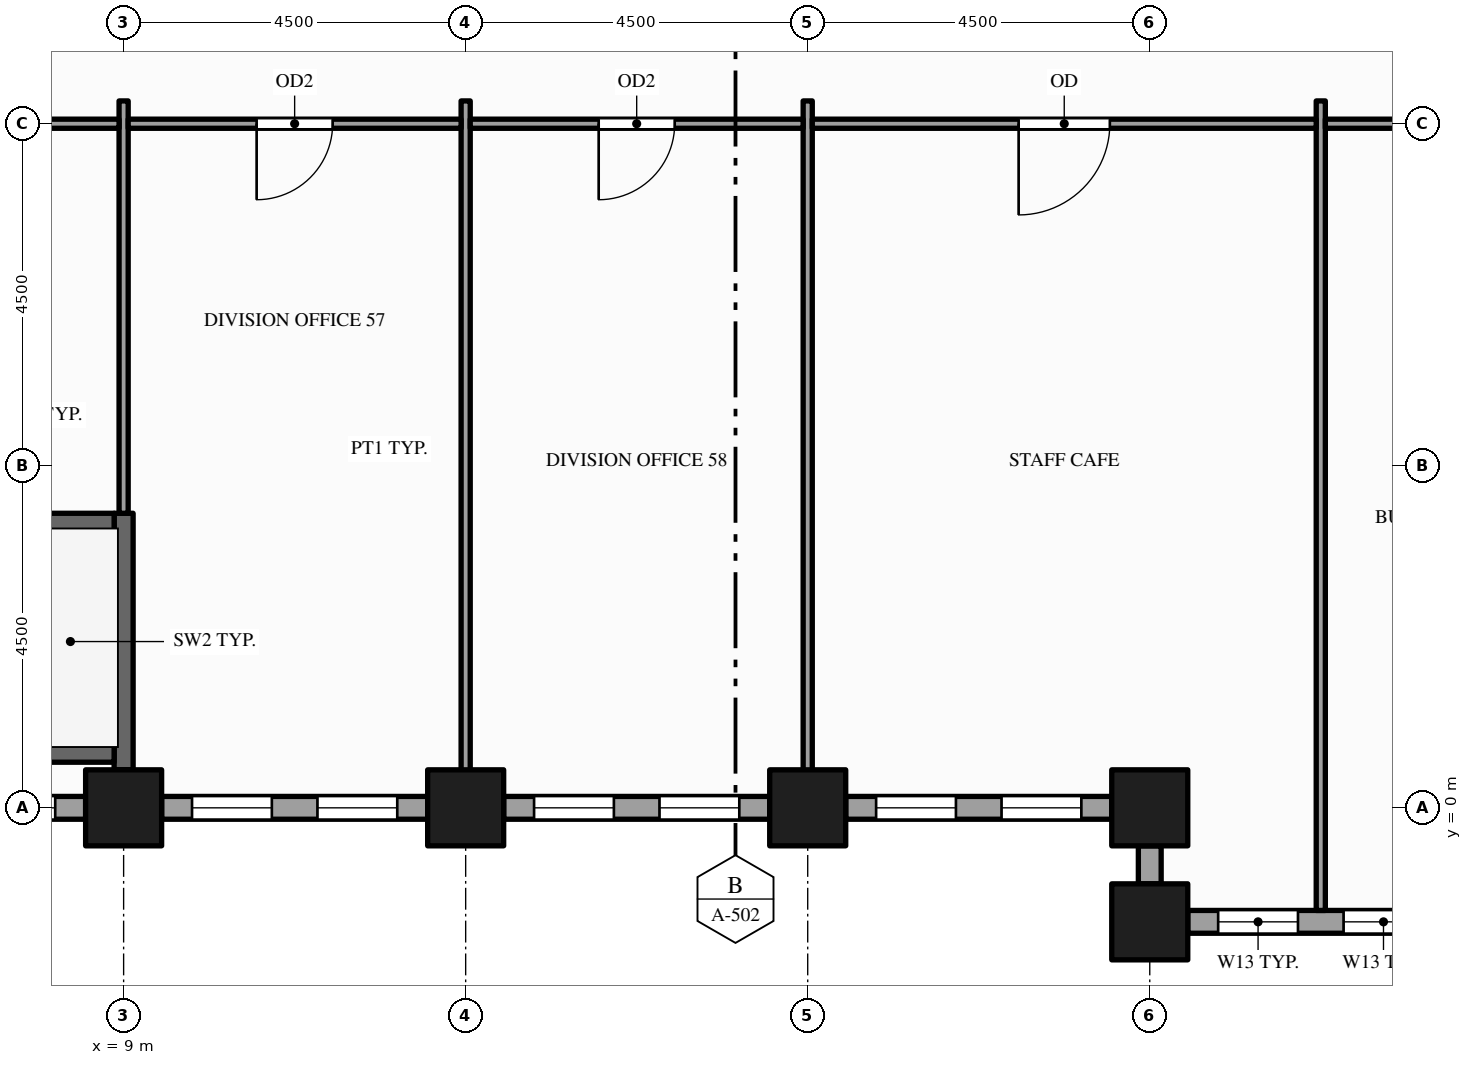
"""IFC4 building model, lengths in metres.
Left out: names, types, materials, properties, quantities, classifications, styles, units other than length and angle.
Written with IfcOpenShell. Run it as: python <this file> out.ifc"""

import sys

from ifc_helpers import new_model, si_unit, direction, frame, frame_2d, origin, origin_2d, place, context, subcontext, project, spatial, rectangle, hollow_rectangle, extrude, element, fill, save


model = new_model("IFC4")
c1 = context("Model", 3, precision=1e-05, world=origin(), true_north=direction((0.0, 1.0)))
c2 = subcontext(c1, "Body", "Model", "MODEL_VIEW")
j1 = project(units=[si_unit("LENGTHUNIT", "METRE"), si_unit("PLANEANGLEUNIT", "RADIAN")], contexts=[c1])
p1 = place(None, origin())
s1 = spatial("IfcSite", under=j1, at=p1, CompositionType="ELEMENT")
p2 = place(p1, origin())
s2 = spatial("IfcBuilding", under=s1, at=p2, CompositionType="ELEMENT")
p3 = place(p2, frame((0.0, 0.0, 119.0)))
s3 = spatial("IfcBuildingStorey", under=s2, at=p3, CompositionType="ELEMENT", Elevation=119.0)
for number, where, z_axis, x_axis in (
    (1, (9.0, 0.0, -0.15), (0.0, 0.0, 1.0), (1.0, 0.0, 0.0)),
    (2, (13.5, 0.0, -0.15), (0.0, 0.0, 1.0), (1.0, 0.0, 0.0)),
    (3, (18.0, 0.0, -0.15), (0.0, 0.0, 1.0), (1.0, 0.0, 0.0)),
    (4, (22.5, -1.5, -0.15), (0.0, 0.0, 1.0), (1.0, 0.0, 0.0)),
    (5, (22.5, 0.0, -0.15), (0.0, 0.0, 1.0), (1.0, 0.0, 0.0)),
):
    element("IfcColumn", number, at=place(p3, frame(where, z_axis=z_axis, x_axis=x_axis)), inside=s3, PredefinedType="COLUMN", context=c2, shape_type="SweptSolid", body=[
        extrude(hollow_rectangle(XDim=1.0, YDim=1.0, WallThickness=0.05, at=origin_2d()), origin(), (0.0, 0.0, 1.0), 4.0),
    ])
p4 = place(p3, frame((23.0, -1.5, 0.0), z_axis=(0.0, 0.0, 1.0), x_axis=(1.0, 0.0, 0.0)))
e6 = element("IfcWall", 6, at=p4, inside=s3, PredefinedType="STANDARD", context=c2, shape_type="SweptSolid", body=[
    extrude(rectangle(XDim=3.5, YDim=0.3, at=frame_2d((1.75, 0.0))), origin(), (0.0, 0.0, 1.0), 3.154),
])
p5 = place(p4, frame((0.4, 0.0, 0.9)))
e7 = element("IfcOpeningElement", 7, at=p5, cuts=e6, PredefinedType="OPENING", context=c2, shape_type="SweptSolid", body=[
    extrude(rectangle(XDim=1.05, YDim=2.0, at=frame_2d((0.525, 1.0))), frame((0.0, 0.16, 0.0), z_axis=(0.0, -1.0, 0.0), x_axis=(1.0, 0.0, 0.0)), (0.0, 0.0, 1.0), 0.32),
])
p6 = place(p4, frame((2.05, 0.0, 0.9)))
e8 = element("IfcOpeningElement", 8, at=p6, cuts=e6, PredefinedType="OPENING", context=c2, shape_type="SweptSolid", body=[
    extrude(rectangle(XDim=1.05, YDim=2.0, at=frame_2d((0.525, 1.0))), frame((0.0, 0.16, 0.0), z_axis=(0.0, -1.0, 0.0), x_axis=(1.0, 0.0, 0.0)), (0.0, 0.0, 1.0), 0.32),
])
p7 = place(p3, frame((5.0, 0.0, 0.0), z_axis=(0.0, 0.0, 1.0), x_axis=(1.0, 0.0, 0.0)))
e9 = element("IfcWall", 9, at=p7, inside=s3, PredefinedType="STANDARD", context=c2, shape_type="SweptSolid", body=[
    extrude(rectangle(XDim=3.5, YDim=0.3, at=frame_2d((1.75, 0.0))), origin(), (0.0, 0.0, 1.0), 3.154),
])
p8 = place(p7, frame((0.4, 0.0, 0.9)))
e10 = element("IfcOpeningElement", 10, at=p8, cuts=e9, PredefinedType="OPENING", context=c2, shape_type="SweptSolid", body=[
    extrude(rectangle(XDim=1.05, YDim=2.0, at=frame_2d((0.525, 1.0))), frame((0.0, 0.16, 0.0), z_axis=(0.0, -1.0, 0.0), x_axis=(1.0, 0.0, 0.0)), (0.0, 0.0, 1.0), 0.32),
])
p9 = place(p7, frame((2.05, 0.0, 0.9)))
e11 = element("IfcOpeningElement", 11, at=p9, cuts=e9, PredefinedType="OPENING", context=c2, shape_type="SweptSolid", body=[
    extrude(rectangle(XDim=1.05, YDim=2.0, at=frame_2d((0.525, 1.0))), frame((0.0, 0.16, 0.0), z_axis=(0.0, -1.0, 0.0), x_axis=(1.0, 0.0, 0.0)), (0.0, 0.0, 1.0), 0.32),
])
p10 = place(p3, frame((9.5, 0.0, 0.0), z_axis=(0.0, 0.0, 1.0), x_axis=(1.0, 0.0, 0.0)))
e12 = element("IfcWall", 12, at=p10, inside=s3, PredefinedType="STANDARD", context=c2, shape_type="SweptSolid", body=[
    extrude(rectangle(XDim=3.5, YDim=0.3, at=frame_2d((1.75, 0.0))), origin(), (0.0, 0.0, 1.0), 3.154),
])
p11 = place(p10, frame((0.4, 0.0, 0.9)))
e13 = element("IfcOpeningElement", 13, at=p11, cuts=e12, PredefinedType="OPENING", context=c2, shape_type="SweptSolid", body=[
    extrude(rectangle(XDim=1.05, YDim=2.0, at=frame_2d((0.525, 1.0))), frame((0.0, 0.16, 0.0), z_axis=(0.0, -1.0, 0.0), x_axis=(1.0, 0.0, 0.0)), (0.0, 0.0, 1.0), 0.32),
])
p12 = place(p10, frame((2.05, 0.0, 0.9)))
e14 = element("IfcOpeningElement", 14, at=p12, cuts=e12, PredefinedType="OPENING", context=c2, shape_type="SweptSolid", body=[
    extrude(rectangle(XDim=1.05, YDim=2.0, at=frame_2d((0.525, 1.0))), frame((0.0, 0.16, 0.0), z_axis=(0.0, -1.0, 0.0), x_axis=(1.0, 0.0, 0.0)), (0.0, 0.0, 1.0), 0.32),
])
p13 = place(p3, frame((14.0, 0.0, 0.0), z_axis=(0.0, 0.0, 1.0), x_axis=(1.0, 0.0, 0.0)))
e15 = element("IfcWall", 15, at=p13, inside=s3, PredefinedType="STANDARD", context=c2, shape_type="SweptSolid", body=[
    extrude(rectangle(XDim=3.5, YDim=0.3, at=frame_2d((1.75, 0.0))), origin(), (0.0, 0.0, 1.0), 3.154),
])
p14 = place(p13, frame((0.4, 0.0, 0.9)))
e16 = element("IfcOpeningElement", 16, at=p14, cuts=e15, PredefinedType="OPENING", context=c2, shape_type="SweptSolid", body=[
    extrude(rectangle(XDim=1.05, YDim=2.0, at=frame_2d((0.525, 1.0))), frame((0.0, 0.16, 0.0), z_axis=(0.0, -1.0, 0.0), x_axis=(1.0, 0.0, 0.0)), (0.0, 0.0, 1.0), 0.32),
])
p15 = place(p13, frame((2.05, 0.0, 0.9)))
e17 = element("IfcOpeningElement", 17, at=p15, cuts=e15, PredefinedType="OPENING", context=c2, shape_type="SweptSolid", body=[
    extrude(rectangle(XDim=1.05, YDim=2.0, at=frame_2d((0.525, 1.0))), frame((0.0, 0.16, 0.0), z_axis=(0.0, -1.0, 0.0), x_axis=(1.0, 0.0, 0.0)), (0.0, 0.0, 1.0), 0.32),
])
p16 = place(p3, frame((18.5, 0.0, 0.0), z_axis=(0.0, 0.0, 1.0), x_axis=(1.0, 0.0, 0.0)))
e18 = element("IfcWall", 18, at=p16, inside=s3, PredefinedType="STANDARD", context=c2, shape_type="SweptSolid", body=[
    extrude(rectangle(XDim=3.5, YDim=0.3, at=frame_2d((1.75, 0.0))), origin(), (0.0, 0.0, 1.0), 3.154),
])
p17 = place(p16, frame((0.4, 0.0, 0.9)))
e19 = element("IfcOpeningElement", 19, at=p17, cuts=e18, PredefinedType="OPENING", context=c2, shape_type="SweptSolid", body=[
    extrude(rectangle(XDim=1.05, YDim=2.0, at=frame_2d((0.525, 1.0))), frame((0.0, 0.16, 0.0), z_axis=(0.0, -1.0, 0.0), x_axis=(1.0, 0.0, 0.0)), (0.0, 0.0, 1.0), 0.32),
])
p18 = place(p16, frame((2.05, 0.0, 0.9)))
e20 = element("IfcOpeningElement", 20, at=p18, cuts=e18, PredefinedType="OPENING", context=c2, shape_type="SweptSolid", body=[
    extrude(rectangle(XDim=1.05, YDim=2.0, at=frame_2d((0.525, 1.0))), frame((0.0, 0.16, 0.0), z_axis=(0.0, -1.0, 0.0), x_axis=(1.0, 0.0, 0.0)), (0.0, 0.0, 1.0), 0.32),
])
p19 = place(p3, frame((22.5, -0.5, 0.0), z_axis=(0.0, 0.0, 1.0), x_axis=(0.0, -1.0, 0.0)))
e21 = element("IfcWall", 21, at=p19, inside=s3, PredefinedType="STANDARD", context=c2, shape_type="SweptSolid", body=[
    extrude(rectangle(XDim=0.5, YDim=0.3, at=frame_2d((0.25, 0.0))), origin(), (0.0, 0.0, 1.0), 3.154),
])
p20 = place(p3, frame((9.0, 0.15, 0.0), z_axis=(0.0, 0.0, 1.0), x_axis=(0.0, 1.0, 0.0)))
e22 = element("IfcWall", 22, at=p20, inside=s3, PredefinedType="PARTITIONING", context=c2, shape_type="SweptSolid", body=[
    extrude(rectangle(XDim=0.35, YDim=0.12, at=frame_2d((0.175, 0.0))), origin(), (0.0, 0.0, 1.0), 3.85),
])
p21 = place(p3, frame((9.0, 0.5, 0.0), z_axis=(0.0, 0.0, 1.0), x_axis=(0.0, 1.0, 0.0)))
e23 = element("IfcWall", 23, at=p21, inside=s3, PredefinedType="SHEAR", context=c2, shape_type="SweptSolid", body=[
    extrude(rectangle(XDim=3.375, YDim=0.25, at=frame_2d((1.688, 0.0))), origin(), (0.0, 0.0, 1.0), 3.85),
])
p22 = place(p3, frame((9.0, 3.875, 0.0), z_axis=(0.0, 0.0, 1.0), x_axis=(0.0, 1.0, 0.0)))
e24 = element("IfcWall", 24, at=p22, inside=s3, PredefinedType="PARTITIONING", context=c2, shape_type="SweptSolid", body=[
    extrude(rectangle(XDim=5.425, YDim=0.12, at=frame_2d((2.712, 0.0))), origin(), (0.0, 0.0, 1.0), 2.938),
])
for number, where, z_axis, x_axis in (
    (25, (13.5, 0.15, 0.0), (0.0, 0.0, 1.0), (0.0, 1.0, 0.0)),
    (26, (18.0, 0.15, 0.0), (0.0, 0.0, 1.0), (0.0, 1.0, 0.0)),
):
    element("IfcWall", number, at=place(p3, frame(where, z_axis=z_axis, x_axis=x_axis)), inside=s3, PredefinedType="PARTITIONING", context=c2, shape_type="SweptSolid", body=[
        extrude(rectangle(XDim=9.15, YDim=0.12, at=frame_2d((4.575, 0.0))), origin(), (0.0, 0.0, 1.0), 2.938),
    ])
p23 = place(p3, frame((24.75, -1.35, 0.0), z_axis=(0.0, 0.0, 1.0), x_axis=(0.0, 1.0, 0.0)))
e27 = element("IfcWall", 27, at=p23, inside=s3, PredefinedType="PARTITIONING", context=c2, shape_type="SweptSolid", body=[
    extrude(rectangle(XDim=10.65, YDim=0.12, at=frame_2d((5.325, 0.0))), origin(), (0.0, 0.0, 1.0), 2.76),
])
p24 = place(p3, frame((0.85, 0.725, 0.0), z_axis=(0.0, 0.0, 1.0), x_axis=(1.0, 0.0, 0.0)))
e28 = element("IfcWall", 28, at=p24, inside=s3, PredefinedType="SHEAR", context=c2, shape_type="SweptSolid", body=[
    extrude(rectangle(XDim=8.025, YDim=0.25, at=frame_2d((4.012, 0.0))), origin(), (0.0, 0.0, 1.0), 3.85),
])
p25 = place(p3, frame((0.85, 3.75, 0.0), z_axis=(0.0, 0.0, 1.0), x_axis=(1.0, 0.0, 0.0)))
e29 = element("IfcWall", 29, at=p25, inside=s3, PredefinedType="SHEAR", context=c2, shape_type="SweptSolid", body=[
    extrude(rectangle(XDim=8.025, YDim=0.25, at=frame_2d((4.012, 0.0))), origin(), (0.0, 0.0, 1.0), 3.85),
])
p26 = place(p25, frame((0.15, 0.0, 0.0)))
e30 = element("IfcOpeningElement", 30, at=p26, cuts=e29, PredefinedType="OPENING", context=c2, shape_type="SweptSolid", body=[
    extrude(rectangle(XDim=1.1, YDim=2.1, at=frame_2d((0.55, 1.05))), frame((0.0, 0.135, 0.0), z_axis=(0.0, -1.0, 0.0), x_axis=(1.0, 0.0, 0.0)), (0.0, 0.0, 1.0), 0.27),
])
p27 = place(p3, frame((0.15, 9.0, 0.0), z_axis=(0.0, 0.0, 1.0), x_axis=(1.0, 0.0, 0.0)))
e31 = element("IfcWall", 31, at=p27, inside=s3, PredefinedType="PARTITIONING", context=c2, shape_type="SweptSolid", body=[
    extrude(rectangle(XDim=8.79, YDim=0.12, at=frame_2d((4.395, 0.0))), origin(), (0.0, 0.0, 1.0), 2.938),
])
p28 = place(p27, frame((3.805, 0.0, 0.0)))
e32 = element("IfcOpeningElement", 32, at=p28, cuts=e31, PredefinedType="OPENING", context=c2, shape_type="SweptSolid", body=[
    extrude(rectangle(XDim=1.2, YDim=2.1, at=frame_2d((0.6, 1.05))), frame((0.0, 0.07, 0.0), z_axis=(0.0, -1.0, 0.0), x_axis=(1.0, 0.0, 0.0)), (0.0, 0.0, 1.0), 0.14),
])
p29 = place(p3, frame((9.06, 9.0, 0.0), z_axis=(0.0, 0.0, 1.0), x_axis=(1.0, 0.0, 0.0)))
e33 = element("IfcWall", 33, at=p29, inside=s3, PredefinedType="PARTITIONING", context=c2, shape_type="SweptSolid", body=[
    extrude(rectangle(XDim=4.38, YDim=0.12, at=frame_2d((2.19, 0.0))), origin(), (0.0, 0.0, 1.0), 2.938),
])
p30 = place(p29, frame((1.69, 0.0, 0.0)))
e34 = element("IfcOpeningElement", 34, at=p30, cuts=e33, PredefinedType="OPENING", context=c2, shape_type="SweptSolid", body=[
    extrude(rectangle(XDim=1.0, YDim=2.1, at=frame_2d((0.5, 1.05))), frame((0.0, 0.07, 0.0), z_axis=(0.0, -1.0, 0.0), x_axis=(1.0, 0.0, 0.0)), (0.0, 0.0, 1.0), 0.14),
])
p31 = place(p3, frame((13.56, 9.0, 0.0), z_axis=(0.0, 0.0, 1.0), x_axis=(1.0, 0.0, 0.0)))
e35 = element("IfcWall", 35, at=p31, inside=s3, PredefinedType="PARTITIONING", context=c2, shape_type="SweptSolid", body=[
    extrude(rectangle(XDim=4.38, YDim=0.12, at=frame_2d((2.19, 0.0))), origin(), (0.0, 0.0, 1.0), 2.938),
])
p32 = place(p31, frame((1.69, 0.0, 0.0)))
e36 = element("IfcOpeningElement", 36, at=p32, cuts=e35, PredefinedType="OPENING", context=c2, shape_type="SweptSolid", body=[
    extrude(rectangle(XDim=1.0, YDim=2.1, at=frame_2d((0.5, 1.05))), frame((0.0, 0.07, 0.0), z_axis=(0.0, -1.0, 0.0), x_axis=(1.0, 0.0, 0.0)), (0.0, 0.0, 1.0), 0.14),
])
p33 = place(p3, frame((18.06, 9.0, 0.0), z_axis=(0.0, 0.0, 1.0), x_axis=(1.0, 0.0, 0.0)))
e37 = element("IfcWall", 37, at=p33, inside=s3, PredefinedType="PARTITIONING", context=c2, shape_type="SweptSolid", body=[
    extrude(rectangle(XDim=6.63, YDim=0.12, at=frame_2d((3.315, 0.0))), origin(), (0.0, 0.0, 1.0), 2.76),
])
p34 = place(p33, frame((2.715, 0.0, 0.0)))
e38 = element("IfcOpeningElement", 38, at=p34, cuts=e37, PredefinedType="OPENING", context=c2, shape_type="SweptSolid", body=[
    extrude(rectangle(XDim=1.2, YDim=2.1, at=frame_2d((0.6, 1.05))), frame((0.0, 0.07, 0.0), z_axis=(0.0, -1.0, 0.0), x_axis=(1.0, 0.0, 0.0)), (0.0, 0.0, 1.0), 0.14),
])
p35 = place(p3, frame((24.81, 9.0, 0.0), z_axis=(0.0, 0.0, 1.0), x_axis=(1.0, 0.0, 0.0)))
e39 = element("IfcWall", 39, at=p35, inside=s3, PredefinedType="PARTITIONING", context=c2, shape_type="SweptSolid", body=[
    extrude(rectangle(XDim=4.38, YDim=0.12, at=frame_2d((2.19, 0.0))), origin(), (0.0, 0.0, 1.0), 2.76),
])
p36 = place(p35, frame((1.74, 0.0, 0.0)))
e40 = element("IfcOpeningElement", 40, at=p36, cuts=e39, PredefinedType="OPENING", context=c2, shape_type="SweptSolid", body=[
    extrude(rectangle(XDim=0.9, YDim=2.1, at=frame_2d((0.45, 1.05))), frame((0.0, 0.07, 0.0), z_axis=(0.0, -1.0, 0.0), x_axis=(1.0, 0.0, 0.0)), (0.0, 0.0, 1.0), 0.14),
])
p37 = place(p5, origin())
e41 = element("IfcWindow", 41, at=p37, inside=s3, PartitioningType="SINGLE_PANEL", PredefinedType="WINDOW", context=c2, shape_type="SweptSolid", body=[
    extrude(rectangle(XDim=1.05, YDim=2.0, at=frame_2d((0.525, 1.0))), frame((0.0, 0.03, 0.0), z_axis=(0.0, -1.0, 0.0), x_axis=(1.0, 0.0, 0.0)), (0.0, 0.0, 1.0), 0.06),
])
fill(e7, e41)
p38 = place(p6, origin())
e42 = element("IfcWindow", 42, at=p38, inside=s3, PartitioningType="SINGLE_PANEL", PredefinedType="WINDOW", context=c2, shape_type="SweptSolid", body=[
    extrude(rectangle(XDim=1.05, YDim=2.0, at=frame_2d((0.525, 1.0))), frame((0.0, 0.03, 0.0), z_axis=(0.0, -1.0, 0.0), x_axis=(1.0, 0.0, 0.0)), (0.0, 0.0, 1.0), 0.06),
])
fill(e8, e42)
p39 = place(p9, origin())
e43 = element("IfcWindow", 43, at=p39, inside=s3, PartitioningType="SINGLE_PANEL", PredefinedType="WINDOW", context=c2, shape_type="SweptSolid", body=[
    extrude(rectangle(XDim=1.05, YDim=2.0, at=frame_2d((0.525, 1.0))), frame((0.0, 0.03, 0.0), z_axis=(0.0, -1.0, 0.0), x_axis=(1.0, 0.0, 0.0)), (0.0, 0.0, 1.0), 0.06),
])
fill(e11, e43)
p40 = place(p11, origin())
e44 = element("IfcWindow", 44, at=p40, inside=s3, PartitioningType="SINGLE_PANEL", PredefinedType="WINDOW", context=c2, shape_type="SweptSolid", body=[
    extrude(rectangle(XDim=1.05, YDim=2.0, at=frame_2d((0.525, 1.0))), frame((0.0, 0.03, 0.0), z_axis=(0.0, -1.0, 0.0), x_axis=(1.0, 0.0, 0.0)), (0.0, 0.0, 1.0), 0.06),
])
fill(e13, e44)
p41 = place(p12, origin())
e45 = element("IfcWindow", 45, at=p41, inside=s3, PartitioningType="SINGLE_PANEL", PredefinedType="WINDOW", context=c2, shape_type="SweptSolid", body=[
    extrude(rectangle(XDim=1.05, YDim=2.0, at=frame_2d((0.525, 1.0))), frame((0.0, 0.03, 0.0), z_axis=(0.0, -1.0, 0.0), x_axis=(1.0, 0.0, 0.0)), (0.0, 0.0, 1.0), 0.06),
])
fill(e14, e45)
p42 = place(p14, origin())
e46 = element("IfcWindow", 46, at=p42, inside=s3, PartitioningType="SINGLE_PANEL", PredefinedType="WINDOW", context=c2, shape_type="SweptSolid", body=[
    extrude(rectangle(XDim=1.05, YDim=2.0, at=frame_2d((0.525, 1.0))), frame((0.0, 0.03, 0.0), z_axis=(0.0, -1.0, 0.0), x_axis=(1.0, 0.0, 0.0)), (0.0, 0.0, 1.0), 0.06),
])
fill(e16, e46)
p43 = place(p15, origin())
e47 = element("IfcWindow", 47, at=p43, inside=s3, PartitioningType="SINGLE_PANEL", PredefinedType="WINDOW", context=c2, shape_type="SweptSolid", body=[
    extrude(rectangle(XDim=1.05, YDim=2.0, at=frame_2d((0.525, 1.0))), frame((0.0, 0.03, 0.0), z_axis=(0.0, -1.0, 0.0), x_axis=(1.0, 0.0, 0.0)), (0.0, 0.0, 1.0), 0.06),
])
fill(e17, e47)
p44 = place(p17, origin())
e48 = element("IfcWindow", 48, at=p44, inside=s3, PartitioningType="SINGLE_PANEL", PredefinedType="WINDOW", context=c2, shape_type="SweptSolid", body=[
    extrude(rectangle(XDim=1.05, YDim=2.0, at=frame_2d((0.525, 1.0))), frame((0.0, 0.03, 0.0), z_axis=(0.0, -1.0, 0.0), x_axis=(1.0, 0.0, 0.0)), (0.0, 0.0, 1.0), 0.06),
])
fill(e19, e48)
p45 = place(p18, origin())
e49 = element("IfcWindow", 49, at=p45, inside=s3, PartitioningType="SINGLE_PANEL", PredefinedType="WINDOW", context=c2, shape_type="SweptSolid", body=[
    extrude(rectangle(XDim=1.05, YDim=2.0, at=frame_2d((0.525, 1.0))), frame((0.0, 0.03, 0.0), z_axis=(0.0, -1.0, 0.0), x_axis=(1.0, 0.0, 0.0)), (0.0, 0.0, 1.0), 0.06),
])
fill(e20, e49)
p46 = place(p30, origin())
e50 = element("IfcDoor", 50, at=p46, inside=s3, OperationType="SINGLE_SWING_LEFT", PredefinedType="DOOR", context=c2, shape_type="SweptSolid", body=[
    extrude(rectangle(XDim=1.0, YDim=2.1, at=frame_2d((0.5, 1.05))), frame((0.0, 0.025, 0.0), z_axis=(0.0, -1.0, 0.0), x_axis=(1.0, 0.0, 0.0)), (0.0, 0.0, 1.0), 0.05),
])
fill(e34, e50)
p47 = place(p32, origin())
e51 = element("IfcDoor", 51, at=p47, inside=s3, OperationType="SINGLE_SWING_LEFT", PredefinedType="DOOR", context=c2, shape_type="SweptSolid", body=[
    extrude(rectangle(XDim=1.0, YDim=2.1, at=frame_2d((0.5, 1.05))), frame((0.0, 0.025, 0.0), z_axis=(0.0, -1.0, 0.0), x_axis=(1.0, 0.0, 0.0)), (0.0, 0.0, 1.0), 0.05),
])
fill(e36, e51)
p48 = place(p34, origin())
e52 = element("IfcDoor", 52, at=p48, inside=s3, OperationType="SINGLE_SWING_LEFT", PredefinedType="DOOR", context=c2, shape_type="SweptSolid", body=[
    extrude(rectangle(XDim=1.2, YDim=2.1, at=frame_2d((0.6, 1.05))), frame((0.0, 0.025, 0.0), z_axis=(0.0, -1.0, 0.0), x_axis=(1.0, 0.0, 0.0)), (0.0, 0.0, 1.0), 0.05),
])
fill(e38, e52)
save(model, sys.argv[1])
